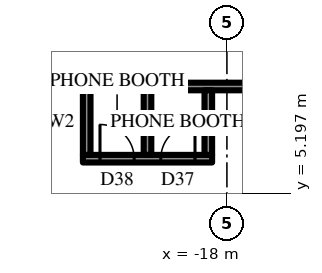
"""IFC4 building model, lengths in metres.
Left out: names, types, materials, properties, quantities, classifications, styles, units other than length and angle.
Written with IfcOpenShell. Run it as: python <this file> out.ifc"""

import sys

from ifc_helpers import new_model, si_unit, direction, frame, frame_2d, origin, place, context, subcontext, project, spatial, rectangle, extrude, element, fill, save


model = new_model("IFC4")
c1 = context("Model", 3, precision=1e-05, world=origin(), true_north=direction((0.0, 1.0)))
c2 = subcontext(c1, "Body", "Model", "MODEL_VIEW")
j1 = project(units=[si_unit("LENGTHUNIT", "METRE"), si_unit("PLANEANGLEUNIT", "RADIAN")], contexts=[c1])
p1 = place(None, origin())
s1 = spatial("IfcSite", under=j1, at=p1, CompositionType="ELEMENT")
p2 = place(p1, origin())
s2 = spatial("IfcBuilding", under=s1, at=p2, CompositionType="ELEMENT")
p3 = place(p2, frame((0.0, 0.0, 253.3)))
s3 = spatial("IfcBuildingStorey", under=s2, at=p3, CompositionType="ELEMENT", Elevation=253.3)
p4 = place(p3, frame((-15.5, 8.0, 0.0), z_axis=(0.0, 0.0, 1.0), x_axis=(-1.0, 0.0, 0.0)))
e1 = element("IfcWall", 1, at=p4, inside=s3, PredefinedType="PARTITIONING", context=c2, shape_type="SweptSolid", body=[
    extrude(rectangle(XDim=13.113, YDim=0.2, at=frame_2d((6.557, 0.0))), origin(), (0.0, 0.0, 1.0), 4.0),
])
p5 = place(p4, frame((0.811, 0.0, 0.0)))
e2 = element("IfcOpeningElement", 2, at=p5, cuts=e1, PredefinedType="OPENING", context=c2, shape_type="SweptSolid", body=[
    extrude(rectangle(XDim=1.0, YDim=2.2, at=frame_2d((0.5, 1.1))), frame((0.0, 0.11, 0.0), z_axis=(0.0, -1.0, 0.0), x_axis=(1.0, 0.0, 0.0)), (0.0, 0.0, 1.0), 0.22),
])
p6 = place(p3, frame((-18.39, 6.1, 0.0), z_axis=(0.0, 0.0, 1.0), x_axis=(-1.0, 0.0, 0.0)))
e3 = element("IfcWall", 3, at=p6, inside=s3, PredefinedType="PARTITIONING", context=c2, shape_type="SweptSolid", body=[
    extrude(rectangle(XDim=3.4, YDim=0.2, at=frame_2d((1.7, 0.0))), origin(), (0.0, 0.0, 1.0), 4.0),
])
p7 = place(p6, frame((0.45, 0.0, 0.0)))
e4 = element("IfcOpeningElement", 4, at=p7, cuts=e3, PredefinedType="OPENING", context=c2, shape_type="SweptSolid", body=[
    extrude(rectangle(XDim=0.9, YDim=2.2, at=frame_2d((0.45, 1.1))), frame((0.0, 0.11, 0.0), z_axis=(0.0, -1.0, 0.0), x_axis=(1.0, 0.0, 0.0)), (0.0, 0.0, 1.0), 0.22),
])
p8 = place(p6, frame((2.05, 0.0, 0.0)))
e5 = element("IfcOpeningElement", 5, at=p8, cuts=e3, PredefinedType="OPENING", context=c2, shape_type="SweptSolid", body=[
    extrude(rectangle(XDim=0.9, YDim=2.2, at=frame_2d((0.45, 1.1))), frame((0.0, 0.11, 0.0), z_axis=(0.0, -1.0, 0.0), x_axis=(1.0, 0.0, 0.0)), (0.0, 0.0, 1.0), 0.22),
])
for number, where, z_axis, x_axis in (
    (6, (-18.49, 7.9, 0.0), (0.0, 0.0, 1.0), (0.0, -1.0, 0.0)),
    (7, (-20.09, 7.9, 0.0), (0.0, 0.0, 1.0), (0.0, -1.0, 0.0)),
    (8, (-21.69, 7.9, 0.0), (0.0, 0.0, 1.0), (0.0, -1.0, 0.0)),
):
    element("IfcWall", number, at=place(p3, frame(where, z_axis=z_axis, x_axis=x_axis)), inside=s3, PredefinedType="PARTITIONING", context=c2, shape_type="SweptSolid", body=[
        extrude(rectangle(XDim=1.7, YDim=0.2, at=frame_2d((0.85, 0.0))), origin(), (0.0, 0.0, 1.0), 4.0),
    ])
p9 = place(p7, frame((0.9, 0.0, 0.0), z_axis=(0.0, 0.0, 1.0), x_axis=(-1.0, 0.0, 0.0)))
e9 = element("IfcDoor", 9, at=p9, inside=s3, OperationType="SINGLE_SWING_LEFT", PredefinedType="DOOR", context=c2, shape_type="SweptSolid", body=[
    extrude(rectangle(XDim=0.9, YDim=2.2, at=frame_2d((0.45, 1.1))), frame((0.0, 0.025, 0.0), z_axis=(0.0, -1.0, 0.0), x_axis=(1.0, 0.0, 0.0)), (0.0, 0.0, 1.0), 0.05),
])
fill(e4, e9)
p10 = place(p8, frame((0.9, 0.0, 0.0), z_axis=(0.0, 0.0, 1.0), x_axis=(-1.0, 0.0, 0.0)))
e10 = element("IfcDoor", 10, at=p10, inside=s3, OperationType="SINGLE_SWING_RIGHT", PredefinedType="DOOR", context=c2, shape_type="SweptSolid", body=[
    extrude(rectangle(XDim=0.9, YDim=2.2, at=frame_2d((0.45, 1.1))), frame((0.0, 0.025, 0.0), z_axis=(0.0, -1.0, 0.0), x_axis=(1.0, 0.0, 0.0)), (0.0, 0.0, 1.0), 0.05),
])
fill(e5, e10)
save(model, sys.argv[1])
